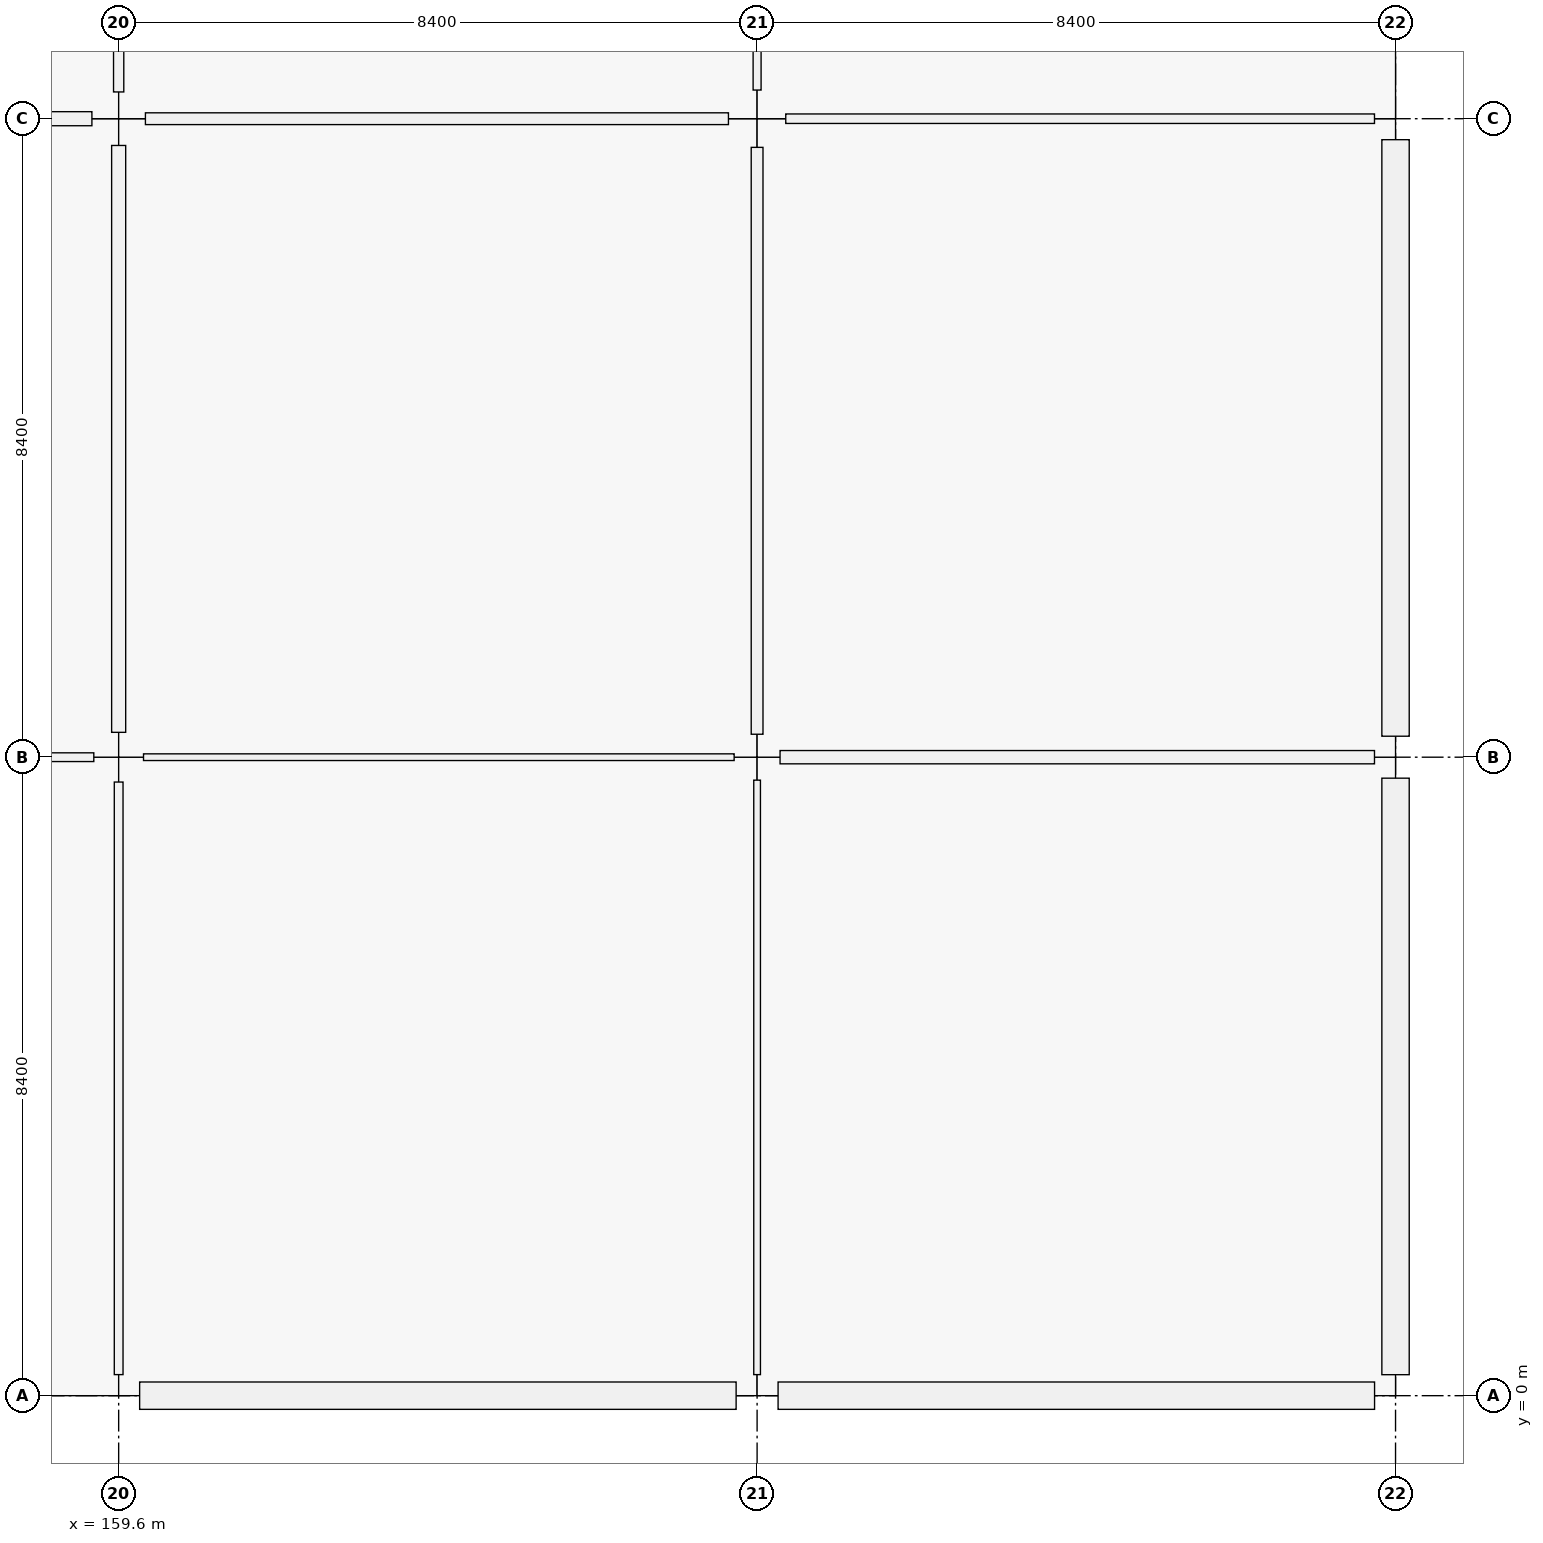
"""IFC4 building model, lengths in metres.
Left out: names, types, materials, properties, quantities, classifications, styles, units other than length and angle.
Written with IfcOpenShell. Run it as: python <this file> out.ifc"""

import sys

from ifc_helpers import new_model, si_unit, direction, frame, frame_2d, origin, origin_2d, place, context, subcontext, project, spatial, rectangle, extrude, element, fill, save


model = new_model("IFC4")
c1 = context("Model", 3, precision=1e-05, world=origin(), true_north=direction((0.0, 1.0)))
c2 = subcontext(c1, "Body", "Model", "MODEL_VIEW")
j1 = project(units=[si_unit("LENGTHUNIT", "METRE"), si_unit("PLANEANGLEUNIT", "RADIAN")], contexts=[c1])
p1 = place(None, origin())
s1 = spatial("IfcSite", under=j1, at=p1, CompositionType="ELEMENT")
p2 = place(p1, origin())
s2 = spatial("IfcBuilding", under=s1, at=p2, CompositionType="ELEMENT")
p3 = place(p2, frame((0.0, 0.0, 5.76)))
s3 = spatial("IfcBuildingStorey", under=s2, at=p3, CompositionType="ELEMENT", Elevation=5.76)
p4 = place(p3, frame((159.6, 0.0, 0.0), z_axis=(0.0, 0.0, 1.0), x_axis=(1.0, 0.0, 0.0)))
e1 = element("IfcColumn", 1, at=p4, inside=s3, PredefinedType="COLUMN", context=c2, shape_type="SweptSolid", body=[
    extrude(rectangle(XDim=0.55, YDim=0.55, at=origin_2d()), origin(), (0.0, 0.0, 1.0), 4.2),
])
p5 = place(p3, frame((159.6, 8.4, 0.0), z_axis=(0.0, 0.0, 1.0), x_axis=(1.0, 0.0, 0.0)))
e2 = element("IfcColumn", 2, at=p5, inside=s3, PredefinedType="COLUMN", context=c2, shape_type="SweptSolid", body=[
    extrude(rectangle(XDim=0.65, YDim=0.65, at=origin_2d()), origin(), (0.0, 0.0, 1.0), 4.5),
])
p6 = place(p3, frame((159.6, 16.8, 0.0), z_axis=(0.0, 0.0, 1.0), x_axis=(1.0, 0.0, 0.0)))
e3 = element("IfcColumn", 3, at=p6, inside=s3, PredefinedType="COLUMN", context=c2, shape_type="SweptSolid", body=[
    extrude(rectangle(XDim=0.7, YDim=0.7, at=origin_2d()), origin(), (0.0, 0.0, 1.0), 4.5),
])
p7 = place(p3, frame((168.0, 0.0, 0.0), z_axis=(0.0, 0.0, 1.0), x_axis=(1.0, 0.0, 0.0)))
e4 = element("IfcColumn", 4, at=p7, inside=s3, PredefinedType="COLUMN", context=c2, shape_type="SweptSolid", body=[
    extrude(rectangle(XDim=0.55, YDim=0.55, at=origin_2d()), origin(), (0.0, 0.0, 1.0), 4.2),
])
p8 = place(p3, frame((168.0, 8.4, 0.0), z_axis=(0.0, 0.0, 1.0), x_axis=(1.0, 0.0, 0.0)))
e5 = element("IfcColumn", 5, at=p8, inside=s3, PredefinedType="COLUMN", context=c2, shape_type="SweptSolid", body=[
    extrude(rectangle(XDim=0.6, YDim=0.6, at=origin_2d()), origin(), (0.0, 0.0, 1.0), 4.5),
])
p9 = place(p3, frame((168.0, 16.8, 0.0), z_axis=(0.0, 0.0, 1.0), x_axis=(1.0, 0.0, 0.0)))
e6 = element("IfcColumn", 6, at=p9, inside=s3, PredefinedType="COLUMN", context=c2, shape_type="SweptSolid", body=[
    extrude(rectangle(XDim=0.75, YDim=0.75, at=origin_2d()), origin(), (0.0, 0.0, 1.0), 4.5),
])
for number, where, z_axis, x_axis in (
    (7, (176.4, 0.0, 0.0), (0.0, 0.0, 1.0), (1.0, 0.0, 0.0)),
    (8, (176.4, 8.4, 0.0), (0.0, 0.0, 1.0), (1.0, 0.0, 0.0)),
    (9, (176.4, 16.8, 0.0), (0.0, 0.0, 1.0), (1.0, 0.0, 0.0)),
):
    element("IfcColumn", number, at=place(p3, frame(where, z_axis=z_axis, x_axis=x_axis)), inside=s3, PredefinedType="COLUMN", context=c2, shape_type="SweptSolid", body=[
        extrude(rectangle(XDim=0.55, YDim=0.55, at=origin_2d()), origin(), (0.0, 0.0, 1.0), 4.2),
    ])
p10 = place(p3, frame((167.724, 0.0, 0.0), z_axis=(0.0, 0.0, 1.0), x_axis=(-1.0, 0.0, 0.0)))
e10 = element("IfcWall", 10, at=p10, inside=s3, PredefinedType="SOLIDWALL", context=c2, shape_type="SweptSolid", body=[
    extrude(rectangle(XDim=7.848, YDim=0.36, at=frame_2d((3.924, 0.0))), origin(), (0.0, 0.0, 1.0), 3.4),
])
p11 = place(p10, frame((3.199, 0.0, 0.9)))
e11 = element("IfcOpeningElement", 11, at=p11, cuts=e10, PredefinedType="OPENING", context=c2, shape_type="SweptSolid", body=[
    extrude(rectangle(XDim=1.45, YDim=1.85, at=frame_2d((0.725, 0.925))), frame((0.0, 0.18, 0.0), z_axis=(0.0, -1.0, 0.0), x_axis=(1.0, 0.0, 0.0)), (0.0, 0.0, 1.0), 0.36),
])
p12 = place(p3, frame((176.124, 0.0, 0.0), z_axis=(0.0, 0.0, 1.0), x_axis=(-1.0, 0.0, 0.0)))
e12 = element("IfcWall", 12, at=p12, inside=s3, PredefinedType="SOLIDWALL", context=c2, shape_type="SweptSolid", body=[
    extrude(rectangle(XDim=7.848, YDim=0.36, at=frame_2d((3.924, 0.0))), origin(), (0.0, 0.0, 1.0), 3.4),
])
p13 = place(p12, frame((3.049, 0.0, 0.9)))
e13 = element("IfcOpeningElement", 13, at=p13, cuts=e12, PredefinedType="OPENING", context=c2, shape_type="SweptSolid", body=[
    extrude(rectangle(XDim=1.75, YDim=1.95, at=frame_2d((0.875, 0.975))), frame((0.0, 0.18, 0.0), z_axis=(0.0, -1.0, 0.0), x_axis=(1.0, 0.0, 0.0)), (0.0, 0.0, 1.0), 0.36),
])
p14 = place(p3, frame((176.4, 8.124, 0.0), z_axis=(0.0, 0.0, 1.0), x_axis=(0.0, -1.0, 0.0)))
e14 = element("IfcWall", 14, at=p14, inside=s3, PredefinedType="SOLIDWALL", context=c2, shape_type="SweptSolid", body=[
    extrude(rectangle(XDim=7.848, YDim=0.36, at=frame_2d((3.924, 0.0))), origin(), (0.0, 0.0, 1.0), 3.4),
])
p15 = place(p14, frame((2.849, 0.0, 0.9)))
e15 = element("IfcOpeningElement", 15, at=p15, cuts=e14, PredefinedType="OPENING", context=c2, shape_type="SweptSolid", body=[
    extrude(rectangle(XDim=2.15, YDim=1.95, at=frame_2d((1.075, 0.975))), frame((0.0, 0.18, 0.0), z_axis=(0.0, -1.0, 0.0), x_axis=(1.0, 0.0, 0.0)), (0.0, 0.0, 1.0), 0.36),
])
p16 = place(p3, frame((176.4, 16.524, 0.0), z_axis=(0.0, 0.0, 1.0), x_axis=(0.0, -1.0, 0.0)))
e16 = element("IfcWall", 16, at=p16, inside=s3, PredefinedType="SOLIDWALL", context=c2, shape_type="SweptSolid", body=[
    extrude(rectangle(XDim=7.848, YDim=0.36, at=frame_2d((3.924, 0.0))), origin(), (0.0, 0.0, 1.0), 3.4),
])
p17 = place(p16, frame((2.649, 0.0, 0.9)))
e17 = element("IfcOpeningElement", 17, at=p17, cuts=e16, PredefinedType="OPENING", context=c2, shape_type="SweptSolid", body=[
    extrude(rectangle(XDim=2.55, YDim=1.95, at=frame_2d((1.275, 0.975))), frame((0.0, 0.18, 0.0), z_axis=(0.0, -1.0, 0.0), x_axis=(1.0, 0.0, 0.0)), (0.0, 0.0, 1.0), 0.36),
])
p18 = place(p3, frame((151.502, 8.4, 0.0), z_axis=(0.0, 0.0, 1.0), x_axis=(1.0, 0.0, 0.0)))
e18 = element("IfcWall", 18, at=p18, inside=s3, PredefinedType="PARTITIONING", context=c2, shape_type="SweptSolid", body=[
    extrude(rectangle(XDim=7.771, YDim=0.115, at=frame_2d((3.885, 0.0))), origin(), (0.0, 0.0, 1.0), 2.4),
])
p19 = place(p18, frame((3.396, 0.0, 0.0)))
e19 = element("IfcOpeningElement", 19, at=p19, cuts=e18, PredefinedType="OPENING", context=c2, shape_type="SweptSolid", body=[
    extrude(rectangle(XDim=0.98, YDim=2.18, at=frame_2d((0.49, 1.09))), frame((0.0, 0.058, 0.0), z_axis=(0.0, -1.0, 0.0), x_axis=(1.0, 0.0, 0.0)), (0.0, 0.0, 1.0), 0.115),
])
p20 = place(p3, frame((151.577, 16.8, 0.0), z_axis=(0.0, 0.0, 1.0), x_axis=(1.0, 0.0, 0.0)))
e20 = element("IfcWall", 20, at=p20, inside=s3, PredefinedType="PARTITIONING", context=c2, shape_type="SweptSolid", body=[
    extrude(rectangle(XDim=7.671, YDim=0.185, at=frame_2d((3.835, 0.0))), origin(), (0.0, 0.0, 1.0), 2.4),
])
p21 = place(p20, frame((3.356, 0.0, 0.0)))
e21 = element("IfcOpeningElement", 21, at=p21, cuts=e20, PredefinedType="OPENING", context=c2, shape_type="SweptSolid", body=[
    extrude(rectangle(XDim=0.96, YDim=2.18, at=frame_2d((0.48, 1.09))), frame((0.0, 0.093, 0.0), z_axis=(0.0, -1.0, 0.0), x_axis=(1.0, 0.0, 0.0)), (0.0, 0.0, 1.0), 0.185),
])
p22 = place(p3, frame((159.927, 8.4, 0.0), z_axis=(0.0, 0.0, 1.0), x_axis=(1.0, 0.0, 0.0)))
e22 = element("IfcWall", 22, at=p22, inside=s3, PredefinedType="PARTITIONING", context=c2, shape_type="SweptSolid", body=[
    extrude(rectangle(XDim=7.771, YDim=0.088, at=frame_2d((3.885, 0.0))), origin(), (0.0, 0.0, 1.0), 2.4),
])
p23 = place(p22, frame((3.381, 0.0, 0.0)))
e23 = element("IfcOpeningElement", 23, at=p23, cuts=e22, PredefinedType="OPENING", context=c2, shape_type="SweptSolid", body=[
    extrude(rectangle(XDim=1.01, YDim=2.12, at=frame_2d((0.505, 1.06))), frame((0.0, 0.044, 0.0), z_axis=(0.0, -1.0, 0.0), x_axis=(1.0, 0.0, 0.0)), (0.0, 0.0, 1.0), 0.088),
])
p24 = place(p3, frame((159.952, 16.8, 0.0), z_axis=(0.0, 0.0, 1.0), x_axis=(1.0, 0.0, 0.0)))
e24 = element("IfcWall", 24, at=p24, inside=s3, PredefinedType="PARTITIONING", context=c2, shape_type="SweptSolid", body=[
    extrude(rectangle(XDim=7.671, YDim=0.155, at=frame_2d((3.835, 0.0))), origin(), (0.0, 0.0, 1.0), 2.4),
])
p25 = place(p24, frame((3.325, 0.0, 0.0)))
e25 = element("IfcOpeningElement", 25, at=p25, cuts=e24, PredefinedType="OPENING", context=c2, shape_type="SweptSolid", body=[
    extrude(rectangle(XDim=1.02, YDim=2.2, at=frame_2d((0.51, 1.1))), frame((0.0, 0.078, 0.0), z_axis=(0.0, -1.0, 0.0), x_axis=(1.0, 0.0, 0.0)), (0.0, 0.0, 1.0), 0.155),
])
p26 = place(p3, frame((168.302, 8.4, 0.0), z_axis=(0.0, 0.0, 1.0), x_axis=(1.0, 0.0, 0.0)))
e26 = element("IfcWall", 26, at=p26, inside=s3, PredefinedType="PARTITIONING", context=c2, shape_type="SweptSolid", body=[
    extrude(rectangle(XDim=7.821, YDim=0.175, at=frame_2d((3.911, 0.0))), origin(), (0.0, 0.0, 1.0), 2.4),
])
p27 = place(p26, frame((3.37, 0.0, 0.0)))
e27 = element("IfcOpeningElement", 27, at=p27, cuts=e26, PredefinedType="OPENING", context=c2, shape_type="SweptSolid", body=[
    extrude(rectangle(XDim=1.08, YDim=2.22, at=frame_2d((0.54, 1.11))), frame((0.0, 0.087, 0.0), z_axis=(0.0, -1.0, 0.0), x_axis=(1.0, 0.0, 0.0)), (0.0, 0.0, 1.0), 0.175),
])
p28 = place(p3, frame((168.377, 16.8, 0.0), z_axis=(0.0, 0.0, 1.0), x_axis=(1.0, 0.0, 0.0)))
e28 = element("IfcWall", 28, at=p28, inside=s3, PredefinedType="PARTITIONING", context=c2, shape_type="SweptSolid", body=[
    extrude(rectangle(XDim=7.746, YDim=0.125, at=frame_2d((3.873, 0.0))), origin(), (0.0, 0.0, 1.0), 2.4),
])
p29 = place(p28, frame((3.343, 0.0, 0.0)))
e29 = element("IfcOpeningElement", 29, at=p29, cuts=e28, PredefinedType="OPENING", context=c2, shape_type="SweptSolid", body=[
    extrude(rectangle(XDim=1.06, YDim=2.22, at=frame_2d((0.53, 1.11))), frame((0.0, 0.062, 0.0), z_axis=(0.0, -1.0, 0.0), x_axis=(1.0, 0.0, 0.0)), (0.0, 0.0, 1.0), 0.125),
])
p30 = place(p3, frame((159.6, 0.277, 0.0), z_axis=(0.0, 0.0, 1.0), x_axis=(0.0, 1.0, 0.0)))
e30 = element("IfcWall", 30, at=p30, inside=s3, PredefinedType="PARTITIONING", context=c2, shape_type="SweptSolid", body=[
    extrude(rectangle(XDim=7.796, YDim=0.115, at=frame_2d((3.898, 0.0))), origin(), (0.0, 0.0, 1.0), 2.4),
])
p31 = place(p30, frame((3.358, 0.0, 0.0)))
e31 = element("IfcOpeningElement", 31, at=p31, cuts=e30, PredefinedType="OPENING", context=c2, shape_type="SweptSolid", body=[
    extrude(rectangle(XDim=1.08, YDim=2.22, at=frame_2d((0.54, 1.11))), frame((0.0, 0.058, 0.0), z_axis=(0.0, -1.0, 0.0), x_axis=(1.0, 0.0, 0.0)), (0.0, 0.0, 1.0), 0.115),
])
p32 = place(p3, frame((159.6, 8.727, 0.0), z_axis=(0.0, 0.0, 1.0), x_axis=(0.0, 1.0, 0.0)))
e32 = element("IfcWall", 32, at=p32, inside=s3, PredefinedType="PARTITIONING", context=c2, shape_type="SweptSolid", body=[
    extrude(rectangle(XDim=7.721, YDim=0.185, at=frame_2d((3.86, 0.0))), origin(), (0.0, 0.0, 1.0), 2.4),
])
p33 = place(p32, frame((3.33, 0.0, 0.0)))
e33 = element("IfcOpeningElement", 33, at=p33, cuts=e32, PredefinedType="OPENING", context=c2, shape_type="SweptSolid", body=[
    extrude(rectangle(XDim=1.06, YDim=2.22, at=frame_2d((0.53, 1.11))), frame((0.0, 0.093, 0.0), z_axis=(0.0, -1.0, 0.0), x_axis=(1.0, 0.0, 0.0)), (0.0, 0.0, 1.0), 0.185),
])
p34 = place(p3, frame((159.6, 17.152, 0.0), z_axis=(0.0, 0.0, 1.0), x_axis=(0.0, 1.0, 0.0)))
e34 = element("IfcWall", 34, at=p34, inside=s3, PredefinedType="PARTITIONING", context=c2, shape_type="SweptSolid", body=[
    extrude(rectangle(XDim=7.671, YDim=0.135, at=frame_2d((3.835, 0.0))), origin(), (0.0, 0.0, 1.0), 2.4),
])
p35 = place(p34, frame((3.331, 0.0, 0.0)))
e35 = element("IfcOpeningElement", 35, at=p35, cuts=e34, PredefinedType="OPENING", context=c2, shape_type="SweptSolid", body=[
    extrude(rectangle(XDim=1.01, YDim=2.12, at=frame_2d((0.505, 1.06))), frame((0.0, 0.067, 0.0), z_axis=(0.0, -1.0, 0.0), x_axis=(1.0, 0.0, 0.0)), (0.0, 0.0, 1.0), 0.135),
])
p36 = place(p3, frame((168.0, 0.277, 0.0), z_axis=(0.0, 0.0, 1.0), x_axis=(0.0, 1.0, 0.0)))
e36 = element("IfcWall", 36, at=p36, inside=s3, PredefinedType="PARTITIONING", context=c2, shape_type="SweptSolid", body=[
    extrude(rectangle(XDim=7.821, YDim=0.088, at=frame_2d((3.91, 0.0))), origin(), (0.0, 0.0, 1.0), 2.4),
])
p37 = place(p36, frame((3.41, 0.0, 0.0)))
e37 = element("IfcOpeningElement", 37, at=p37, cuts=e36, PredefinedType="OPENING", context=c2, shape_type="SweptSolid", body=[
    extrude(rectangle(XDim=1.0, YDim=2.2, at=frame_2d((0.5, 1.1))), frame((0.0, 0.044, 0.0), z_axis=(0.0, -1.0, 0.0), x_axis=(1.0, 0.0, 0.0)), (0.0, 0.0, 1.0), 0.088),
])
p38 = place(p3, frame((168.0, 8.702, 0.0), z_axis=(0.0, 0.0, 1.0), x_axis=(0.0, 1.0, 0.0)))
e38 = element("IfcWall", 38, at=p38, inside=s3, PredefinedType="PARTITIONING", context=c2, shape_type="SweptSolid", body=[
    extrude(rectangle(XDim=7.721, YDim=0.155, at=frame_2d((3.861, 0.0))), origin(), (0.0, 0.0, 1.0), 2.4),
])
p39 = place(p38, frame((3.37, 0.0, 0.0)))
e39 = element("IfcOpeningElement", 39, at=p39, cuts=e38, PredefinedType="OPENING", context=c2, shape_type="SweptSolid", body=[
    extrude(rectangle(XDim=0.98, YDim=2.18, at=frame_2d((0.49, 1.09))), frame((0.0, 0.078, 0.0), z_axis=(0.0, -1.0, 0.0), x_axis=(1.0, 0.0, 0.0)), (0.0, 0.0, 1.0), 0.155),
])
p40 = place(p3, frame((168.0, 17.177, 0.0), z_axis=(0.0, 0.0, 1.0), x_axis=(0.0, 1.0, 0.0)))
e40 = element("IfcWall", 40, at=p40, inside=s3, PredefinedType="PARTITIONING", context=c2, shape_type="SweptSolid", body=[
    extrude(rectangle(XDim=7.671, YDim=0.105, at=frame_2d((3.835, 0.0))), origin(), (0.0, 0.0, 1.0), 2.4),
])
p41 = place(p40, frame((3.356, 0.0, 0.0)))
e41 = element("IfcOpeningElement", 41, at=p41, cuts=e40, PredefinedType="OPENING", context=c2, shape_type="SweptSolid", body=[
    extrude(rectangle(XDim=0.96, YDim=2.18, at=frame_2d((0.48, 1.09))), frame((0.0, 0.052, 0.0), z_axis=(0.0, -1.0, 0.0), x_axis=(1.0, 0.0, 0.0)), (0.0, 0.0, 1.0), 0.105),
])
p42 = place(p11, origin())
e42 = element("IfcWindow", 42, at=p42, inside=s3, PartitioningType="SINGLE_PANEL", PredefinedType="WINDOW", context=c2, shape_type="SweptSolid", body=[
    extrude(rectangle(XDim=1.45, YDim=1.85, at=frame_2d((0.725, 0.925))), frame((0.0, 0.03, 0.0), z_axis=(0.0, -1.0, 0.0), x_axis=(1.0, 0.0, 0.0)), (0.0, 0.0, 1.0), 0.06),
])
fill(e11, e42)
p43 = place(p13, origin())
e43 = element("IfcWindow", 43, at=p43, inside=s3, PartitioningType="SINGLE_PANEL", PredefinedType="WINDOW", context=c2, shape_type="SweptSolid", body=[
    extrude(rectangle(XDim=1.75, YDim=1.95, at=frame_2d((0.875, 0.975))), frame((0.0, 0.03, 0.0), z_axis=(0.0, -1.0, 0.0), x_axis=(1.0, 0.0, 0.0)), (0.0, 0.0, 1.0), 0.06),
])
fill(e13, e43)
p44 = place(p15, origin())
e44 = element("IfcWindow", 44, at=p44, inside=s3, PartitioningType="SINGLE_PANEL", PredefinedType="WINDOW", context=c2, shape_type="SweptSolid", body=[
    extrude(rectangle(XDim=2.15, YDim=1.95, at=frame_2d((1.075, 0.975))), frame((0.0, 0.03, 0.0), z_axis=(0.0, -1.0, 0.0), x_axis=(1.0, 0.0, 0.0)), (0.0, 0.0, 1.0), 0.06),
])
fill(e15, e44)
p45 = place(p17, origin())
e45 = element("IfcWindow", 45, at=p45, inside=s3, PartitioningType="SINGLE_PANEL", PredefinedType="WINDOW", context=c2, shape_type="SweptSolid", body=[
    extrude(rectangle(XDim=2.55, YDim=1.95, at=frame_2d((1.275, 0.975))), frame((0.0, 0.03, 0.0), z_axis=(0.0, -1.0, 0.0), x_axis=(1.0, 0.0, 0.0)), (0.0, 0.0, 1.0), 0.06),
])
fill(e17, e45)
p46 = place(p23, origin())
e46 = element("IfcDoor", 46, at=p46, inside=s3, OperationType="SINGLE_SWING_RIGHT", PredefinedType="DOOR", context=c2, shape_type="SweptSolid", body=[
    extrude(rectangle(XDim=1.01, YDim=2.12, at=frame_2d((0.505, 1.06))), frame((0.0, 0.025, 0.0), z_axis=(0.0, -1.0, 0.0), x_axis=(1.0, 0.0, 0.0)), (0.0, 0.0, 1.0), 0.05),
])
fill(e23, e46)
p47 = place(p27, origin())
e47 = element("IfcDoor", 47, at=p47, inside=s3, OperationType="SINGLE_SWING_LEFT", PredefinedType="DOOR", context=c2, shape_type="SweptSolid", body=[
    extrude(rectangle(XDim=1.08, YDim=2.22, at=frame_2d((0.54, 1.11))), frame((0.0, 0.025, 0.0), z_axis=(0.0, -1.0, 0.0), x_axis=(1.0, 0.0, 0.0)), (0.0, 0.0, 1.0), 0.05),
])
fill(e27, e47)
p48 = place(p29, origin())
e48 = element("IfcDoor", 48, at=p48, inside=s3, OperationType="SINGLE_SWING_RIGHT", PredefinedType="DOOR", context=c2, shape_type="SweptSolid", body=[
    extrude(rectangle(XDim=1.06, YDim=2.22, at=frame_2d((0.53, 1.11))), frame((0.0, 0.025, 0.0), z_axis=(0.0, -1.0, 0.0), x_axis=(1.0, 0.0, 0.0)), (0.0, 0.0, 1.0), 0.05),
])
fill(e29, e48)
p49 = place(p25, origin())
e49 = element("IfcDoor", 49, at=p49, inside=s3, OperationType="SINGLE_SWING_LEFT", PredefinedType="DOOR", context=c2, shape_type="SweptSolid", body=[
    extrude(rectangle(XDim=1.02, YDim=2.2, at=frame_2d((0.51, 1.1))), frame((0.0, 0.025, 0.0), z_axis=(0.0, -1.0, 0.0), x_axis=(1.0, 0.0, 0.0)), (0.0, 0.0, 1.0), 0.05),
])
fill(e25, e49)
p50 = place(p31, origin())
e50 = element("IfcDoor", 50, at=p50, inside=s3, OperationType="SINGLE_SWING_LEFT", PredefinedType="DOOR", context=c2, shape_type="SweptSolid", body=[
    extrude(rectangle(XDim=1.08, YDim=2.22, at=frame_2d((0.54, 1.11))), frame((0.0, 0.025, 0.0), z_axis=(0.0, -1.0, 0.0), x_axis=(1.0, 0.0, 0.0)), (0.0, 0.0, 1.0), 0.05),
])
fill(e31, e50)
p51 = place(p33, origin())
e51 = element("IfcDoor", 51, at=p51, inside=s3, OperationType="SINGLE_SWING_RIGHT", PredefinedType="DOOR", context=c2, shape_type="SweptSolid", body=[
    extrude(rectangle(XDim=1.06, YDim=2.22, at=frame_2d((0.53, 1.11))), frame((0.0, 0.025, 0.0), z_axis=(0.0, -1.0, 0.0), x_axis=(1.0, 0.0, 0.0)), (0.0, 0.0, 1.0), 0.05),
])
fill(e33, e51)
p52 = place(p37, origin())
e52 = element("IfcDoor", 52, at=p52, inside=s3, OperationType="SINGLE_SWING_LEFT", PredefinedType="DOOR", context=c2, shape_type="SweptSolid", body=[
    extrude(rectangle(XDim=1.0, YDim=2.2, at=frame_2d((0.5, 1.1))), frame((0.0, 0.025, 0.0), z_axis=(0.0, -1.0, 0.0), x_axis=(1.0, 0.0, 0.0)), (0.0, 0.0, 1.0), 0.05),
])
fill(e37, e52)
p53 = place(p39, origin())
e53 = element("IfcDoor", 53, at=p53, inside=s3, OperationType="SINGLE_SWING_RIGHT", PredefinedType="DOOR", context=c2, shape_type="SweptSolid", body=[
    extrude(rectangle(XDim=0.98, YDim=2.18, at=frame_2d((0.49, 1.09))), frame((0.0, 0.025, 0.0), z_axis=(0.0, -1.0, 0.0), x_axis=(1.0, 0.0, 0.0)), (0.0, 0.0, 1.0), 0.05),
])
fill(e39, e53)
save(model, sys.argv[1])
